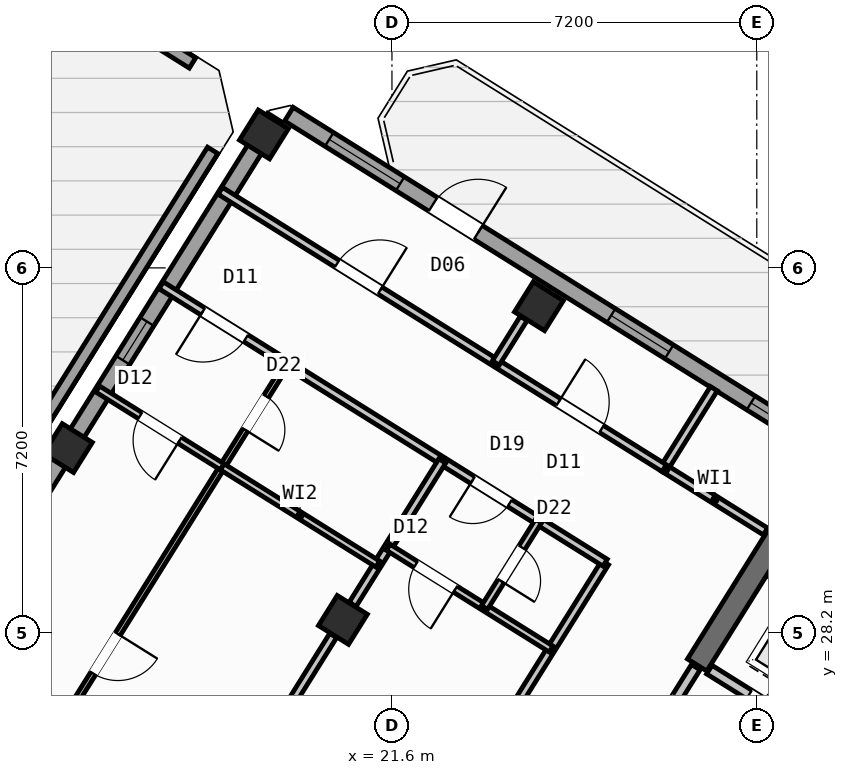
"""IFC4 building model, lengths in metres.
Left out: names, types, materials, properties, quantities, classifications, styles, units other than length and angle.
Written with IfcOpenShell. Run it as: python <this file> out.ifc"""

import sys

from ifc_helpers import new_model, si_unit, direction, frame, frame_2d, origin, origin_2d, place, context, subcontext, project, spatial, rectangle, hollow_rectangle, extrude, source, transform, mapped, element, fill, save


model = new_model("IFC4")
c1 = context("Model", 3, precision=1e-05, world=origin(), true_north=direction((0.0, 1.0)))
c2 = subcontext(c1, "Body", "Model", "MODEL_VIEW")
j1 = project(units=[si_unit("LENGTHUNIT", "METRE"), si_unit("PLANEANGLEUNIT", "RADIAN")], contexts=[c1])
p1 = place(None, origin())
s1 = spatial("IfcSite", under=j1, at=p1, CompositionType="ELEMENT")
p2 = place(p1, origin())
s2 = spatial("IfcBuilding", under=s1, at=p2, CompositionType="ELEMENT")
p3 = place(p2, frame((0.0, 0.0, 280.8)))
s3 = spatial("IfcBuildingStorey", under=s2, at=p3, CompositionType="ELEMENT", Elevation=280.8)
p4 = place(p3, frame((29.544, 30.636, 0.0), z_axis=(0.0, 0.0, 1.0), x_axis=(-0.529902075036, -0.848058836916, 0.0)))
e1 = element("IfcWall", 1, at=p4, inside=s3, PredefinedType="SHEAR", context=c2, shape_type="SweptSolid", body=[
    extrude(rectangle(XDim=3.625, YDim=0.45, at=frame_2d((1.812, 0.0))), origin(), (0.0, 0.0, 1.0), 3.35),
])
m1 = source(origin(), c2, "Body", "SweptSolid", [
    extrude(hollow_rectangle(XDim=0.7, YDim=0.7, WallThickness=0.028, at=origin_2d()), origin(), (0.0, 0.0, 1.0), 3.6),
])
for number, where, z_axis, x_axis in (
    (2, (24.5, 34.643, 0.0), (0.0, 0.0, 1.0), (-0.848, 0.53, 0.0)),
    (3, (20.632, 28.452, 0.0), (0.0, 0.0, 1.0), (-0.848, 0.53, 0.0)),
    (4, (19.073, 38.034, 0.0), (0.0, 0.0, 1.0), (-0.848, 0.53, 0.0)),
    (5, (15.205, 31.844, 0.0), (0.0, 0.0, 1.0), (-0.848, 0.53, 0.0)),
):
    element("IfcColumn", number, at=place(p3, frame(where, z_axis=z_axis, x_axis=x_axis)), inside=s3, PredefinedType="COLUMN", context=c2, shape_type="MappedRepresentation", body=[
        mapped(m1, transform((0.0, 0.0, 0.0), scale=1.0)),
    ])
p5 = place(p3, frame((15.514, 40.789, 0.0), z_axis=(0.0, 0.0, 1.0), x_axis=(0.848041573463, -0.529929702582, 0.0)))
e6 = element("IfcWall", 6, at=p5, inside=s3, PredefinedType="PARAPET", context=c2, shape_type="SweptSolid", body=[
    extrude(rectangle(XDim=2.536, YDim=0.24, at=frame_2d((1.268, 0.0))), origin(), (0.0, 0.0, 1.0), 1.15),
])
p6 = place(p3, frame((18.063, 37.72, 0.0), z_axis=(0.0, 0.0, 1.0), x_axis=(-0.529918910732, -0.848048317048, 0.0)))
e7 = element("IfcWall", 7, at=p6, inside=s3, PredefinedType="PARAPET", context=c2, shape_type="SweptSolid", body=[
    extrude(rectangle(XDim=19.196, YDim=0.24, at=frame_2d((9.598, 0.0))), origin(), (0.0, 0.0, 1.0), 1.15),
])
p7 = place(p3, frame((7.842, 20.061, 0.0), z_axis=(0.0, 0.0, 1.0), x_axis=(0.529915577903, 0.84805039962, 0.0)))
e8 = element("IfcWall", 8, at=p7, inside=s3, PredefinedType="STANDARD", context=c2, shape_type="SweptSolid", body=[
    extrude(rectangle(XDim=21.587, YDim=0.32, at=frame_2d((10.794, 0.0))), origin(), (0.0, 0.0, 1.0), 2.875),
])
p8 = place(p7, frame((2.606, 0.0, 0.9)))
e9 = element("IfcOpeningElement", 9, at=p8, cuts=e8, PredefinedType="OPENING", context=c2, shape_type="SweptSolid", body=[
    extrude(rectangle(XDim=1.65, YDim=1.45, at=frame_2d((0.825, 0.725))), frame((0.0, 0.17, 0.0), z_axis=(0.0, -1.0, 0.0), x_axis=(1.0, 0.0, 0.0)), (0.0, 0.0, 1.0), 0.34),
])
p9 = place(p7, frame((8.094, 0.0, 0.9)))
e10 = element("IfcOpeningElement", 10, at=p9, cuts=e8, PredefinedType="OPENING", context=c2, shape_type="SweptSolid", body=[
    extrude(rectangle(XDim=1.35, YDim=1.45, at=frame_2d((0.675, 0.725))), frame((0.0, 0.17, 0.0), z_axis=(0.0, -1.0, 0.0), x_axis=(1.0, 0.0, 0.0)), (0.0, 0.0, 1.0), 0.34),
])
p10 = place(p7, frame((11.044, 0.0, 0.9)))
e11 = element("IfcOpeningElement", 11, at=p10, cuts=e8, PredefinedType="OPENING", context=c2, shape_type="SweptSolid", body=[
    extrude(rectangle(XDim=1.35, YDim=1.45, at=frame_2d((0.675, 0.725))), frame((0.0, 0.17, 0.0), z_axis=(0.0, -1.0, 0.0), x_axis=(1.0, 0.0, 0.0)), (0.0, 0.0, 1.0), 0.34),
])
p11 = place(p7, frame((15.939, 0.0, 1.0)))
e12 = element("IfcOpeningElement", 12, at=p11, cuts=e8, PredefinedType="OPENING", context=c2, shape_type="SweptSolid", body=[
    extrude(rectangle(XDim=0.9, YDim=1.25, at=frame_2d((0.45, 0.625))), frame((0.0, 0.17, 0.0), z_axis=(0.0, -1.0, 0.0), x_axis=(1.0, 0.0, 0.0)), (0.0, 0.0, 1.0), 0.34),
])
p12 = place(p3, frame((19.566, 38.434, 0.0), z_axis=(0.0, 0.0, 1.0), x_axis=(0.84804567626, -0.529923136858, 0.0)))
e13 = element("IfcWall", 13, at=p12, inside=s3, PredefinedType="STANDARD", context=c2, shape_type="SweptSolid", body=[
    extrude(rectangle(XDim=25.188, YDim=0.32, at=frame_2d((12.594, 0.0))), origin(), (0.0, 0.0, 1.0), 3.35),
])
p13 = place(p12, frame((3.355, 0.0, 0.0)))
e14 = element("IfcOpeningElement", 14, at=p13, cuts=e13, PredefinedType="OPENING", context=c2, shape_type="SweptSolid", body=[
    extrude(rectangle(XDim=1.05, YDim=2.15, at=frame_2d((0.525, 1.075))), frame((0.0, 0.17, 0.0), z_axis=(0.0, -1.0, 0.0), x_axis=(1.0, 0.0, 0.0)), (0.0, 0.0, 1.0), 0.34),
])
p14 = place(p12, frame((0.939, 0.0, 0.9)))
e15 = element("IfcOpeningElement", 15, at=p14, cuts=e13, PredefinedType="OPENING", context=c2, shape_type="SweptSolid", body=[
    extrude(rectangle(XDim=1.65, YDim=1.45, at=frame_2d((0.825, 0.725))), frame((0.0, 0.17, 0.0), z_axis=(0.0, -1.0, 0.0), x_axis=(1.0, 0.0, 0.0)), (0.0, 0.0, 1.0), 0.34),
])
p15 = place(p12, frame((7.499, 0.0, 0.9)))
e16 = element("IfcOpeningElement", 16, at=p15, cuts=e13, PredefinedType="OPENING", context=c2, shape_type="SweptSolid", body=[
    extrude(rectangle(XDim=1.35, YDim=1.45, at=frame_2d((0.675, 0.725))), frame((0.0, 0.17, 0.0), z_axis=(0.0, -1.0, 0.0), x_axis=(1.0, 0.0, 0.0)), (0.0, 0.0, 1.0), 0.34),
])
p16 = place(p12, frame((10.754, 0.0, 1.0)))
e17 = element("IfcOpeningElement", 17, at=p16, cuts=e13, PredefinedType="OPENING", context=c2, shape_type="SweptSolid", body=[
    extrude(rectangle(XDim=0.9, YDim=1.25, at=frame_2d((0.45, 0.625))), frame((0.0, 0.17, 0.0), z_axis=(0.0, -1.0, 0.0), x_axis=(1.0, 0.0, 0.0)), (0.0, 0.0, 1.0), 0.34),
])
p17 = place(p12, frame((15.694, 0.0, 1.0)))
e18 = element("IfcOpeningElement", 18, at=p17, cuts=e13, PredefinedType="OPENING", context=c2, shape_type="SweptSolid", body=[
    extrude(rectangle(XDim=0.9, YDim=1.25, at=frame_2d((0.45, 0.625))), frame((0.0, 0.17, 0.0), z_axis=(0.0, -1.0, 0.0), x_axis=(1.0, 0.0, 0.0)), (0.0, 0.0, 1.0), 0.34),
])
p18 = place(p12, frame((21.394, 0.0, 1.0)))
e19 = element("IfcOpeningElement", 19, at=p18, cuts=e13, PredefinedType="OPENING", context=c2, shape_type="SweptSolid", body=[
    extrude(rectangle(XDim=0.9, YDim=1.25, at=frame_2d((0.45, 0.625))), frame((0.0, 0.17, 0.0), z_axis=(0.0, -1.0, 0.0), x_axis=(1.0, 0.0, 0.0)), (0.0, 0.0, 1.0), 0.34),
])
p19 = place(p3, frame((31.822, 24.998, 0.0), z_axis=(0.0, 0.0, 1.0), x_axis=(-0.848054125777, 0.529909614701, 0.0)))
e20 = element("IfcWall", 20, at=p19, inside=s3, PredefinedType="STANDARD", context=c2, shape_type="SweptSolid", body=[
    extrude(rectangle(XDim=4.668, YDim=0.2, at=frame_2d((2.334, 0.0))), origin(), (0.0, 0.0, 1.0), 3.34),
])
p20 = place(p19, frame((0.52, 0.0, 0.0)))
e21 = element("IfcOpeningElement", 21, at=p20, cuts=e20, PredefinedType="OPENING", context=c2, shape_type="SweptSolid", body=[
    extrude(rectangle(XDim=1.2, YDim=2.15, at=frame_2d((0.6, 1.075))), frame((0.0, 0.11, 0.0), z_axis=(0.0, -1.0, 0.0), x_axis=(1.0, 0.0, 0.0)), (0.0, 0.0, 1.0), 0.22),
])
p21 = place(p19, frame((2.54, 0.0, 0.0)))
e22 = element("IfcOpeningElement", 22, at=p21, cuts=e20, PredefinedType="OPENING", context=c2, shape_type="SweptSolid", body=[
    extrude(rectangle(XDim=1.2, YDim=2.15, at=frame_2d((0.6, 1.075))), frame((0.0, 0.11, 0.0), z_axis=(0.0, -1.0, 0.0), x_axis=(1.0, 0.0, 0.0)), (0.0, 0.0, 1.0), 0.22),
])
p22 = place(p3, frame((27.596, 27.52, 0.0), z_axis=(0.0, 0.0, 1.0), x_axis=(-0.529865479138, -0.848081702443, 0.0)))
e23 = element("IfcWall", 23, at=p22, inside=s3, PredefinedType="STANDARD", context=c2, shape_type="SweptSolid", body=[
    extrude(rectangle(XDim=2.96, YDim=0.2, at=frame_2d((1.48, 0.0))), origin(), (0.0, 0.0, 1.0), 3.34),
])
p23 = place(p22, frame((0.7, 0.0, 0.0)))
e24 = element("IfcOpeningElement", 24, at=p23, cuts=e23, PredefinedType="OPENING", context=c2, shape_type="SweptSolid", body=[
    extrude(rectangle(XDim=1.5, YDim=2.15, at=frame_2d((0.75, 1.075))), frame((0.0, 0.11, 0.0), z_axis=(0.0, -1.0, 0.0), x_axis=(1.0, 0.0, 0.0)), (0.0, 0.0, 1.0), 0.22),
])
p24 = place(p3, frame((28.972, 30.198, 0.0), z_axis=(0.0, 0.0, 1.0), x_axis=(-0.848015752453, 0.529971021464, 0.0)))
e25 = element("IfcWall", 25, at=p24, inside=s3, PredefinedType="PARTITIONING", context=c2, shape_type="SweptSolid", body=[
    extrude(rectangle(XDim=2.358, YDim=0.16, at=frame_2d((1.179, 0.0))), origin(), (0.0, 0.0, 1.0), 3.34),
])
p25 = place(p3, frame((27.953, 33.016, 0.0), z_axis=(0.0, 0.0, 1.0), x_axis=(-0.529880305451, -0.848072439061, 0.0)))
e26 = element("IfcWall", 26, at=p25, inside=s3, PredefinedType="PARTITIONING", context=c2, shape_type="SweptSolid", body=[
    extrude(rectangle(XDim=1.85, YDim=0.16, at=frame_2d((0.925, 0.0))), origin(), (0.0, 0.0, 1.0), 3.34),
])
p26 = place(p3, frame((25.807, 29.582, 0.0), z_axis=(0.0, 0.0, 1.0), x_axis=(-0.529918119251, -0.84804881162, 0.0)))
e27 = element("IfcWall", 27, at=p26, inside=s3, PredefinedType="PARTITIONING", context=c2, shape_type="SweptSolid", body=[
    extrude(rectangle(XDim=17.65, YDim=0.16, at=frame_2d((8.825, 0.0))), origin(), (0.0, 0.0, 1.0), 3.34),
])
p27 = place(p3, frame((26.973, 31.447, 0.0), z_axis=(0.0, 0.0, 1.0), x_axis=(-0.84805406617, 0.529909710094, 0.0)))
e28 = element("IfcWall", 28, at=p27, inside=s3, PredefinedType="PARTITIONING", context=c2, shape_type="SweptSolid", body=[
    extrude(rectangle(XDim=10.33, YDim=0.16, at=frame_2d((5.165, 0.0))), origin(), (0.0, 0.0, 1.0), 3.34),
])
p28 = place(p27, frame((1.459, 0.0, 0.0)))
e29 = element("IfcOpeningElement", 29, at=p28, cuts=e28, PredefinedType="OPENING", context=c2, shape_type="SweptSolid", body=[
    extrude(rectangle(XDim=1.0, YDim=2.1, at=frame_2d((0.5, 1.05))), frame((0.0, 0.09, 0.0), z_axis=(0.0, -1.0, 0.0), x_axis=(1.0, 0.0, 0.0)), (0.0, 0.0, 1.0), 0.18),
])
p29 = place(p27, frame((6.614, 0.0, 0.0)))
e30 = element("IfcOpeningElement", 30, at=p29, cuts=e28, PredefinedType="OPENING", context=c2, shape_type="SweptSolid", body=[
    extrude(rectangle(XDim=1.0, YDim=2.1, at=frame_2d((0.5, 1.05))), frame((0.0, 0.09, 0.0), z_axis=(0.0, -1.0, 0.0), x_axis=(1.0, 0.0, 0.0)), (0.0, 0.0, 1.0), 0.18),
])
p30 = place(p3, frame((25.807, 29.582, 0.0), z_axis=(0.0, 0.0, 1.0), x_axis=(-0.848060702647, 0.529899089097, 0.0)))
e31 = element("IfcWall", 31, at=p30, inside=s3, PredefinedType="PARTITIONING", context=c2, shape_type="SweptSolid", body=[
    extrude(rectangle(XDim=10.33, YDim=0.16, at=frame_2d((5.165, 0.0))), origin(), (0.0, 0.0, 1.0), 3.34),
])
p31 = place(p30, frame((2.22, 0.0, 0.0)))
e32 = element("IfcOpeningElement", 32, at=p31, cuts=e31, PredefinedType="OPENING", context=c2, shape_type="SweptSolid", body=[
    extrude(rectangle(XDim=0.86, YDim=2.05, at=frame_2d((0.43, 1.025))), frame((0.0, 0.09, 0.0), z_axis=(0.0, -1.0, 0.0), x_axis=(1.0, 0.0, 0.0)), (0.0, 0.0, 1.0), 0.18),
])
p32 = place(p30, frame((8.36, 0.0, 0.0)))
e33 = element("IfcOpeningElement", 33, at=p32, cuts=e31, PredefinedType="OPENING", context=c2, shape_type="SweptSolid", body=[
    extrude(rectangle(XDim=1.0, YDim=2.1, at=frame_2d((0.5, 1.05))), frame((0.0, 0.09, 0.0), z_axis=(0.0, -1.0, 0.0), x_axis=(1.0, 0.0, 0.0)), (0.0, 0.0, 1.0), 0.18),
])
p33 = place(p3, frame((22.593, 31.59, 0.0), z_axis=(0.0, 0.0, 1.0), x_axis=(-0.529900320499, -0.848059933221, 0.0)))
e34 = element("IfcWall", 34, at=p33, inside=s3, PredefinedType="PARTITIONING", context=c2, shape_type="SweptSolid", body=[
    extrude(rectangle(XDim=3.338, YDim=0.16, at=frame_2d((1.669, 0.0))), origin(), (0.0, 0.0, 1.0), 2.875),
])
p34 = place(p3, frame((20.44, 28.145, 0.0), z_axis=(0.0, 0.0, 1.0), x_axis=(-0.529938869374, -0.84803584519, 0.0)))
e35 = element("IfcWall", 35, at=p34, inside=s3, PredefinedType="PARTITIONING", context=c2, shape_type="SweptSolid", body=[
    extrude(rectangle(XDim=6.576, YDim=0.16, at=frame_2d((3.288, 0.0))), origin(), (0.0, 0.0, 1.0), 2.875),
])
p35 = place(p3, frame((24.742, 27.877, 0.0), z_axis=(0.0, 0.0, 1.0), x_axis=(-0.848059820872, 0.529900500304, 0.0)))
e36 = element("IfcWall", 36, at=p35, inside=s3, PredefinedType="PLUMBINGWALL", context=c2, shape_type="SweptSolid", body=[
    extrude(rectangle(XDim=3.79, YDim=0.14, at=frame_2d((1.895, 0.0))), origin(), (0.0, 0.0, 1.0), 3.34),
])
p36 = place(p35, frame((2.23, 0.0, 0.0)))
e37 = element("IfcOpeningElement", 37, at=p36, cuts=e36, PredefinedType="OPENING", context=c2, shape_type="SweptSolid", body=[
    extrude(rectangle(XDim=0.92, YDim=2.08, at=frame_2d((0.46, 1.04))), frame((0.0, 0.08, 0.0), z_axis=(0.0, -1.0, 0.0), x_axis=(1.0, 0.0, 0.0)), (0.0, 0.0, 1.0), 0.16),
])
p37 = place(p3, frame((24.492, 30.403, 0.0), z_axis=(0.0, 0.0, 1.0), x_axis=(-0.529933431478, -0.848039243315, 0.0)))
e38 = element("IfcWall", 38, at=p37, inside=s3, PredefinedType="PLUMBINGWALL", context=c2, shape_type="SweptSolid", body=[
    extrude(rectangle(XDim=2.01, YDim=0.14, at=frame_2d((1.005, 0.0))), origin(), (0.0, 0.0, 1.0), 3.025),
])
p38 = place(p37, frame((0.615, 0.0, 0.0)))
e39 = element("IfcOpeningElement", 39, at=p38, cuts=e38, PredefinedType="OPENING", context=c2, shape_type="SweptSolid", body=[
    extrude(rectangle(XDim=0.78, YDim=2.05, at=frame_2d((0.39, 1.025))), frame((0.0, 0.08, 0.0), z_axis=(0.0, -1.0, 0.0), x_axis=(1.0, 0.0, 0.0)), (0.0, 0.0, 1.0), 0.16),
])
p39 = place(p3, frame((19.523, 33.508, 0.0), z_axis=(0.0, 0.0, 1.0), x_axis=(-0.529910765222, -0.848053406869, 0.0)))
e40 = element("IfcWall", 40, at=p39, inside=s3, PredefinedType="PARTITIONING", context=c2, shape_type="SweptSolid", body=[
    extrude(rectangle(XDim=17.92, YDim=0.11, at=frame_2d((8.96, 0.0))), origin(), (0.0, 0.0, 1.0), 3.34),
])
p40 = place(p39, frame((0.76, 0.0, 0.0)))
e41 = element("IfcOpeningElement", 41, at=p40, cuts=e40, PredefinedType="OPENING", context=c2, shape_type="SweptSolid", body=[
    extrude(rectangle(XDim=0.78, YDim=2.05, at=frame_2d((0.39, 1.025))), frame((0.0, 0.065, 0.0), z_axis=(0.0, -1.0, 0.0), x_axis=(1.0, 0.0, 0.0)), (0.0, 0.0, 1.0), 0.13),
])
p41 = place(p39, frame((6.289, 0.0, 0.0)))
e42 = element("IfcOpeningElement", 42, at=p41, cuts=e40, PredefinedType="OPENING", context=c2, shape_type="SweptSolid", body=[
    extrude(rectangle(XDim=0.92, YDim=2.08, at=frame_2d((0.46, 1.04))), frame((0.0, 0.065, 0.0), z_axis=(0.0, -1.0, 0.0), x_axis=(1.0, 0.0, 0.0)), (0.0, 0.0, 1.0), 0.13),
])
p42 = place(p3, frame((18.251, 31.473, 0.0), z_axis=(0.0, 0.0, 1.0), x_axis=(-0.848059786386, 0.529900555496, 0.0)))
e43 = element("IfcWall", 43, at=p42, inside=s3, PredefinedType="PLUMBINGWALL", context=c2, shape_type="SweptSolid", body=[
    extrude(rectangle(XDim=2.9, YDim=0.14, at=frame_2d((1.45, 0.0))), origin(), (0.0, 0.0, 1.0), 3.34),
])
p43 = place(p42, frame((0.99, 0.0, 0.0)))
e44 = element("IfcOpeningElement", 44, at=p43, cuts=e43, PredefinedType="OPENING", context=c2, shape_type="SweptSolid", body=[
    extrude(rectangle(XDim=0.92, YDim=2.08, at=frame_2d((0.46, 1.04))), frame((0.0, 0.08, 0.0), z_axis=(0.0, -1.0, 0.0), x_axis=(1.0, 0.0, 0.0)), (0.0, 0.0, 1.0), 0.16),
])
p44 = place(p3, frame((21.321, 29.554, 0.0), z_axis=(0.0, 0.0, 1.0), x_axis=(-0.848021036626, 0.529962566074, 0.0)))
e45 = element("IfcWall", 45, at=p44, inside=s3, PredefinedType="PLUMBINGWALL", context=c2, shape_type="SweptSolid", body=[
    extrude(rectangle(XDim=3.62, YDim=0.14, at=frame_2d((1.81, 0.0))), origin(), (0.0, 0.0, 1.0), 3.34),
])
p45 = place(p3, frame((24.2, 34.404, 0.0), z_axis=(0.0, 0.0, 1.0), x_axis=(-0.529977795385, -0.848011519025, 0.0)))
e46 = element("IfcWall", 46, at=p45, inside=s3, PredefinedType="PARTITIONING", context=c2, shape_type="SweptSolid", body=[
    extrude(rectangle(XDim=1.038, YDim=0.16, at=frame_2d((0.519, 0.0))), origin(), (0.0, 0.0, 1.0), 2.875),
])
m2 = source(origin(), c2, "Body", "SweptSolid", [
    extrude(rectangle(XDim=1.05, YDim=2.15, at=frame_2d((0.525, 1.075))), frame((0.0, 0.025, 0.0), z_axis=(0.0, -1.0, 0.0), x_axis=(1.0, 0.0, 0.0)), (0.0, 0.0, 1.0), 0.05),
])
p46 = place(p13, origin())
e47 = element("IfcDoor", 47, at=p46, inside=s3, OperationType="SINGLE_SWING_RIGHT", PredefinedType="DOOR", context=c2, shape_type="MappedRepresentation", body=[
    mapped(m2, transform((0.0, 0.0, 0.0), scale=1.0)),
])
fill(e14, e47)
m3 = source(origin(), c2, "Body", "SweptSolid", [
    extrude(rectangle(XDim=0.9, YDim=1.25, at=frame_2d((0.45, 0.625))), frame((0.0, 0.03, 0.0), z_axis=(0.0, -1.0, 0.0), x_axis=(1.0, 0.0, 0.0)), (0.0, 0.0, 1.0), 0.06),
])
p47 = place(p11, origin())
e48 = element("IfcWindow", 48, at=p47, inside=s3, PartitioningType="SINGLE_PANEL", PredefinedType="WINDOW", context=c2, shape_type="MappedRepresentation", body=[
    mapped(m3, transform((0.0, 0.0, 0.0), scale=1.0)),
])
fill(e12, e48)
m4 = source(origin(), c2, "Body", "SweptSolid", [
    extrude(rectangle(XDim=1.65, YDim=1.45, at=frame_2d((0.825, 0.725))), frame((0.0, 0.03, 0.0), z_axis=(0.0, -1.0, 0.0), x_axis=(1.0, 0.0, 0.0)), (0.0, 0.0, 1.0), 0.06),
])
p48 = place(p14, origin())
e49 = element("IfcWindow", 49, at=p48, inside=s3, PartitioningType="SINGLE_PANEL", PredefinedType="WINDOW", context=c2, shape_type="MappedRepresentation", body=[
    mapped(m4, transform((0.0, 0.0, 0.0), scale=1.0)),
])
fill(e15, e49)
m5 = source(origin(), c2, "Body", "SweptSolid", [
    extrude(rectangle(XDim=1.35, YDim=1.45, at=frame_2d((0.675, 0.725))), frame((0.0, 0.03, 0.0), z_axis=(0.0, -1.0, 0.0), x_axis=(1.0, 0.0, 0.0)), (0.0, 0.0, 1.0), 0.06),
])
p49 = place(p15, origin())
e50 = element("IfcWindow", 50, at=p49, inside=s3, PartitioningType="SINGLE_PANEL", PredefinedType="WINDOW", context=c2, shape_type="MappedRepresentation", body=[
    mapped(m5, transform((0.0, 0.0, 0.0), scale=1.0)),
])
fill(e16, e50)
p50 = place(p16, origin())
e51 = element("IfcWindow", 51, at=p50, inside=s3, PartitioningType="SINGLE_PANEL", PredefinedType="WINDOW", context=c2, shape_type="MappedRepresentation", body=[
    mapped(m3, transform((0.0, 0.0, 0.0), scale=1.0)),
])
fill(e17, e51)
m6 = source(origin(), c2, "Body", "SweptSolid", [
    extrude(rectangle(XDim=1.2, YDim=2.15, at=frame_2d((0.6, 1.075))), frame((0.0, 0.025, 0.0), z_axis=(0.0, -1.0, 0.0), x_axis=(1.0, 0.0, 0.0)), (0.0, 0.0, 1.0), 0.05),
])
p51 = place(p21, origin())
e52 = element("IfcDoor", 52, at=p51, inside=s3, OperationType="DOUBLE_DOOR_SLIDING", PredefinedType="DOOR", context=c2, shape_type="MappedRepresentation", body=[
    mapped(m6, transform((0.0, 0.0, 0.0), scale=1.0)),
])
fill(e22, e52)
m7 = source(origin(), c2, "Body", "SweptSolid", [
    extrude(rectangle(XDim=0.86, YDim=2.05, at=frame_2d((0.43, 1.025))), frame((0.0, 0.025, 0.0), z_axis=(0.0, -1.0, 0.0), x_axis=(1.0, 0.0, 0.0)), (0.0, 0.0, 1.0), 0.05),
])
p52 = place(p31, origin())
e53 = element("IfcDoor", 53, at=p52, inside=s3, OperationType="SINGLE_SWING_RIGHT", PredefinedType="DOOR", context=c2, shape_type="MappedRepresentation", body=[
    mapped(m7, transform((0.0, 0.0, 0.0), scale=1.0)),
])
fill(e32, e53)
m8 = source(origin(), c2, "Body", "SweptSolid", [
    extrude(rectangle(XDim=0.92, YDim=2.08, at=frame_2d((0.46, 1.04))), frame((0.0, 0.025, 0.0), z_axis=(0.0, -1.0, 0.0), x_axis=(1.0, 0.0, 0.0)), (0.0, 0.0, 1.0), 0.05),
])
p53 = place(p36, origin())
e54 = element("IfcDoor", 54, at=p53, inside=s3, OperationType="SINGLE_SWING_LEFT", PredefinedType="DOOR", context=c2, shape_type="MappedRepresentation", body=[
    mapped(m8, transform((0.0, 0.0, 0.0), scale=1.0)),
])
fill(e37, e54)
m9 = source(origin(), c2, "Body", "SweptSolid", [
    extrude(rectangle(XDim=0.78, YDim=2.05, at=frame_2d((0.39, 1.025))), frame((0.0, 0.025, 0.0), z_axis=(0.0, -1.0, 0.0), x_axis=(1.0, 0.0, 0.0)), (0.0, 0.0, 1.0), 0.05),
])
p54 = place(p38, origin())
e55 = element("IfcDoor", 55, at=p54, inside=s3, OperationType="SINGLE_SWING_RIGHT", PredefinedType="DOOR", context=c2, shape_type="MappedRepresentation", body=[
    mapped(m9, transform((0.0, 0.0, 0.0), scale=1.0)),
])
fill(e39, e55)
m10 = source(origin(), c2, "Body", "SweptSolid", [
    extrude(rectangle(XDim=1.0, YDim=2.1, at=frame_2d((0.5, 1.05))), frame((0.0, 0.025, 0.0), z_axis=(0.0, -1.0, 0.0), x_axis=(1.0, 0.0, 0.0)), (0.0, 0.0, 1.0), 0.05),
])
p55 = place(p32, origin())
e56 = element("IfcDoor", 56, at=p55, inside=s3, OperationType="SINGLE_SWING_RIGHT", PredefinedType="DOOR", context=c2, shape_type="MappedRepresentation", body=[
    mapped(m10, transform((0.0, 0.0, 0.0), scale=1.0)),
])
fill(e33, e56)
p56 = place(p43, origin())
e57 = element("IfcDoor", 57, at=p56, inside=s3, OperationType="SINGLE_SWING_LEFT", PredefinedType="DOOR", context=c2, shape_type="MappedRepresentation", body=[
    mapped(m8, transform((0.0, 0.0, 0.0), scale=1.0)),
])
fill(e44, e57)
p57 = place(p40, origin())
e58 = element("IfcDoor", 58, at=p57, inside=s3, OperationType="SINGLE_SWING_RIGHT", PredefinedType="DOOR", context=c2, shape_type="MappedRepresentation", body=[
    mapped(m9, transform((0.0, 0.0, 0.0), scale=1.0)),
])
fill(e41, e58)
p58 = place(p41, origin())
e59 = element("IfcDoor", 59, at=p58, inside=s3, OperationType="SINGLE_SWING_LEFT", PredefinedType="DOOR", context=c2, shape_type="MappedRepresentation", body=[
    mapped(m8, transform((0.0, 0.0, 0.0), scale=1.0)),
])
fill(e42, e59)
p59 = place(p28, frame((1.0, 0.0, 0.0), z_axis=(0.0, 0.0, 1.0), x_axis=(-1.0, 0.0, 0.0)))
e60 = element("IfcDoor", 60, at=p59, inside=s3, OperationType="SINGLE_SWING_LEFT", PredefinedType="DOOR", context=c2, shape_type="MappedRepresentation", body=[
    mapped(m10, transform((0.0, 0.0, 0.0), scale=1.0)),
])
fill(e29, e60)
p60 = place(p29, frame((1.0, 0.0, 0.0), z_axis=(0.0, 0.0, 1.0), x_axis=(-1.0, 0.0, 0.0)))
e61 = element("IfcDoor", 61, at=p60, inside=s3, OperationType="SINGLE_SWING_RIGHT", PredefinedType="DOOR", context=c2, shape_type="MappedRepresentation", body=[
    mapped(m10, transform((0.0, 0.0, 0.0), scale=1.0)),
])
fill(e30, e61)
save(model, sys.argv[1])
